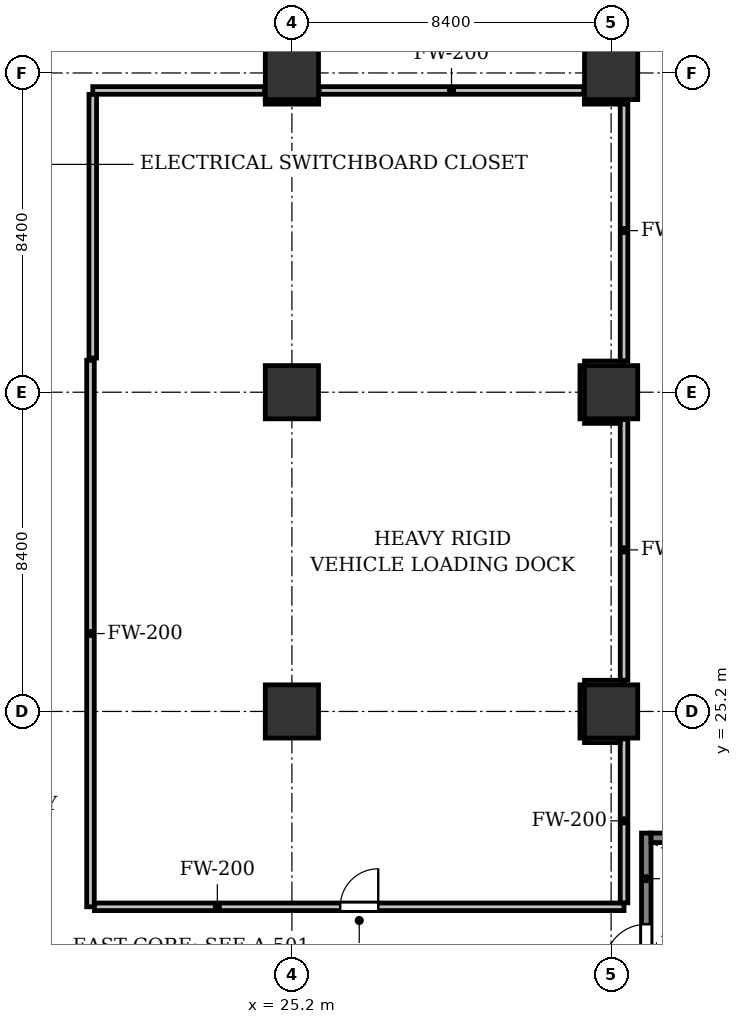
"""IFC4 building model, lengths in metres.
Left out: names, types, materials, properties, quantities, classifications, styles, units other than length and angle.
Written with IfcOpenShell. Run it as: python <this file> out.ifc"""

import sys

from ifc_helpers import new_model, si_unit, direction, frame, frame_2d, origin, origin_2d, place, context, subcontext, project, spatial, rectangle, extrude, element, fill, save


model = new_model("IFC4")
c1 = context("Model", 3, precision=1e-05, world=origin(), true_north=direction((0.0, 1.0)))
c2 = subcontext(c1, "Body", "Model", "MODEL_VIEW")
j1 = project(units=[si_unit("LENGTHUNIT", "METRE"), si_unit("PLANEANGLEUNIT", "RADIAN")], contexts=[c1])
p1 = place(None, origin())
s1 = spatial("IfcSite", under=j1, at=p1, CompositionType="ELEMENT")
p2 = place(p1, origin())
s2 = spatial("IfcBuilding", under=s1, at=p2, CompositionType="ELEMENT")
p3 = place(p2, frame((0.0, 0.0, -4.8)))
s3 = spatial("IfcBuildingStorey", under=s2, at=p3, CompositionType="ELEMENT", Elevation=-4.8)
for number, where, z_axis, x_axis in (
    (1, (25.2, 25.2, 0.0), (0.0, 0.0, 1.0), (1.0, 0.0, 0.0)),
    (2, (25.2, 33.6, 0.0), (0.0, 0.0, 1.0), (1.0, 0.0, 0.0)),
    (3, (25.2, 42.0, 0.0), (0.0, 0.0, 1.0), (1.0, 0.0, 0.0)),
    (4, (33.6, 25.2, 0.0), (0.0, 0.0, 1.0), (1.0, 0.0, 0.0)),
    (5, (33.6, 33.6, 0.0), (0.0, 0.0, 1.0), (1.0, 0.0, 0.0)),
    (6, (33.6, 42.0, 0.0), (0.0, 0.0, 1.0), (1.0, 0.0, 0.0)),
):
    element("IfcColumn", number, at=place(p3, frame(where, z_axis=z_axis, x_axis=x_axis)), inside=s3, PredefinedType="COLUMN", context=c2, shape_type="SweptSolid", body=[
        extrude(rectangle(XDim=1.4, YDim=1.4, at=origin_2d()), origin(), (0.0, 0.0, 1.0), 4.8),
    ])
p4 = place(p3, frame((34.525, 17.55, 0.0), z_axis=(0.0, 0.0, 1.0), x_axis=(0.0, 1.0, 0.0)))
e7 = element("IfcWall", 7, at=p4, inside=s3, PredefinedType="SHEAR", context=c2, shape_type="SweptSolid", body=[
    extrude(rectangle(XDim=4.45, YDim=0.25, at=frame_2d((2.225, 0.0))), origin(), (0.0, 0.0, 1.0), 4.48),
])
p5 = place(p4, frame((0.95, 0.0, 0.0)))
e8 = element("IfcOpeningElement", 8, at=p5, cuts=e7, PredefinedType="OPENING", context=c2, shape_type="SweptSolid", body=[
    extrude(rectangle(XDim=1.1, YDim=2.15, at=frame_2d((0.55, 1.075))), frame((0.0, 0.135, 0.0), z_axis=(0.0, -1.0, 0.0), x_axis=(1.0, 0.0, 0.0)), (0.0, 0.0, 1.0), 0.27),
])
p6 = place(p3, frame((34.65, 21.875, 0.0), z_axis=(0.0, 0.0, 1.0), x_axis=(1.0, 0.0, 0.0)))
e9 = element("IfcWall", 9, at=p6, inside=s3, PredefinedType="SHEAR", context=c2, shape_type="SweptSolid", body=[
    extrude(rectangle(XDim=7.95, YDim=0.25, at=frame_2d((3.975, 0.0))), origin(), (0.0, 0.0, 1.0), 4.48),
])
p7 = place(p3, frame((19.9, 34.44, 0.0), z_axis=(0.0, 0.0, 1.0), x_axis=(0.0, -1.0, 0.0)))
e10 = element("IfcWall", 10, at=p7, inside=s3, PredefinedType="PARTITIONING", context=c2, shape_type="SweptSolid", body=[
    extrude(rectangle(XDim=14.38, YDim=0.2, at=frame_2d((7.19, 0.0))), origin(), (0.0, 0.0, 1.0), 3.78),
])
p8 = place(p3, frame((20.004, 20.06, 0.0), z_axis=(0.0, 0.0, 1.0), x_axis=(1.0, 0.0, 0.0)))
e11 = element("IfcWall", 11, at=p8, inside=s3, PredefinedType="PARTITIONING", context=c2, shape_type="SweptSolid", body=[
    extrude(rectangle(XDim=13.936, YDim=0.2, at=frame_2d((6.968, 0.0))), origin(), (0.0, 0.0, 1.0), 3.868),
])
p9 = place(p8, frame((6.468, 0.0, 0.0)))
e12 = element("IfcOpeningElement", 12, at=p9, cuts=e11, PredefinedType="OPENING", context=c2, shape_type="SweptSolid", body=[
    extrude(rectangle(XDim=1.0, YDim=2.15, at=frame_2d((0.5, 1.075))), frame((0.0, 0.11, 0.0), z_axis=(0.0, -1.0, 0.0), x_axis=(1.0, 0.0, 0.0)), (0.0, 0.0, 1.0), 0.22),
])
p10 = place(p3, frame((33.94, 20.164, 0.0), z_axis=(0.0, 0.0, 1.0), x_axis=(0.0, 1.0, 0.0)))
e13 = element("IfcWall", 13, at=p10, inside=s3, PredefinedType="PARTITIONING", context=c2, shape_type="SweptSolid", body=[
    extrude(rectangle(XDim=4.316, YDim=0.2, at=frame_2d((2.158, 0.0))), origin(), (0.0, 0.0, 1.0), 4.48),
])
p11 = place(p3, frame((33.836, 24.48, 0.0), z_axis=(0.0, 0.0, 1.0), x_axis=(-1.0, 0.0, 0.0)))
e14 = element("IfcWall", 14, at=p11, inside=s3, PredefinedType="PARTITIONING", context=c2, shape_type="SweptSolid", body=[
    extrude(rectangle(XDim=0.936, YDim=0.2, at=frame_2d((0.468, 0.0))), origin(), (0.0, 0.0, 1.0), 3.868),
])
p12 = place(p3, frame((32.88, 24.5, 0.0), z_axis=(0.0, 0.0, 1.0), x_axis=(0.0, 1.0, 0.0)))
e15 = element("IfcWall", 15, at=p12, inside=s3, PredefinedType="PARTITIONING", context=c2, shape_type="SweptSolid", body=[
    extrude(rectangle(XDim=1.4, YDim=0.2, at=frame_2d((0.7, 0.0))), origin(), (0.0, 0.0, 1.0), 3.78),
])
p13 = place(p3, frame((32.9, 25.92, 0.0), z_axis=(0.0, 0.0, 1.0), x_axis=(1.0, 0.0, 0.0)))
e16 = element("IfcWall", 16, at=p13, inside=s3, PredefinedType="PARTITIONING", context=c2, shape_type="SweptSolid", body=[
    extrude(rectangle(XDim=1.04, YDim=0.2, at=frame_2d((0.52, 0.0))), origin(), (0.0, 0.0, 1.0), 3.868),
])
p14 = place(p3, frame((33.94, 26.024, 0.0), z_axis=(0.0, 0.0, 1.0), x_axis=(0.0, 1.0, 0.0)))
e17 = element("IfcWall", 17, at=p14, inside=s3, PredefinedType="PARTITIONING", context=c2, shape_type="SweptSolid", body=[
    extrude(rectangle(XDim=6.856, YDim=0.2, at=frame_2d((3.428, 0.0))), origin(), (0.0, 0.0, 1.0), 4.48),
])
p15 = place(p3, frame((33.836, 32.88, 0.0), z_axis=(0.0, 0.0, 1.0), x_axis=(-1.0, 0.0, 0.0)))
e18 = element("IfcWall", 18, at=p15, inside=s3, PredefinedType="PARTITIONING", context=c2, shape_type="SweptSolid", body=[
    extrude(rectangle(XDim=0.936, YDim=0.2, at=frame_2d((0.468, 0.0))), origin(), (0.0, 0.0, 1.0), 3.868),
])
p16 = place(p3, frame((32.88, 32.9, 0.0), z_axis=(0.0, 0.0, 1.0), x_axis=(0.0, 1.0, 0.0)))
e19 = element("IfcWall", 19, at=p16, inside=s3, PredefinedType="PARTITIONING", context=c2, shape_type="SweptSolid", body=[
    extrude(rectangle(XDim=1.4, YDim=0.2, at=frame_2d((0.7, 0.0))), origin(), (0.0, 0.0, 1.0), 3.78),
])
p17 = place(p3, frame((32.9, 34.32, 0.0), z_axis=(0.0, 0.0, 1.0), x_axis=(1.0, 0.0, 0.0)))
e20 = element("IfcWall", 20, at=p17, inside=s3, PredefinedType="PARTITIONING", context=c2, shape_type="SweptSolid", body=[
    extrude(rectangle(XDim=1.04, YDim=0.2, at=frame_2d((0.52, 0.0))), origin(), (0.0, 0.0, 1.0), 3.868),
])
p18 = place(p3, frame((33.94, 34.424, 0.0), z_axis=(0.0, 0.0, 1.0), x_axis=(0.0, 1.0, 0.0)))
e21 = element("IfcWall", 21, at=p18, inside=s3, PredefinedType="PARTITIONING", context=c2, shape_type="SweptSolid", body=[
    extrude(rectangle(XDim=6.856, YDim=0.2, at=frame_2d((3.428, 0.0))), origin(), (0.0, 0.0, 1.0), 4.48),
])
p19 = place(p3, frame((33.94, 41.28, 0.0), z_axis=(0.0, 0.0, 1.0), x_axis=(-0.999999890616, 0.000467726796, 0.0)))
e22 = element("IfcWall", 22, at=p19, inside=s3, PredefinedType="PARTITIONING", context=c2, shape_type="SweptSolid", body=[
    extrude(rectangle(XDim=1.044, YDim=0.2, at=frame_2d((0.522, 0.0))), origin(), (0.0, 0.0, 1.0), 3.868),
])
p20 = place(p3, frame((32.88, 41.54, 0.0), z_axis=(0.0, 0.0, 1.0), x_axis=(-1.0, 0.0, 0.0)))
e23 = element("IfcWall", 23, at=p20, inside=s3, PredefinedType="PARTITIONING", context=c2, shape_type="SweptSolid", body=[
    extrude(rectangle(XDim=6.96, YDim=0.2, at=frame_2d((3.48, 0.0))), origin(), (0.0, 0.0, 1.0), 4.074),
])
p21 = place(p3, frame((25.904, 41.281, 0.0), z_axis=(0.0, 0.0, 1.0), x_axis=(-0.999999939509, -0.000347826066, 0.0)))
e24 = element("IfcWall", 24, at=p21, inside=s3, PredefinedType="PARTITIONING", context=c2, shape_type="SweptSolid", body=[
    extrude(rectangle(XDim=1.404, YDim=0.2, at=frame_2d((0.702, 0.0))), origin(), (0.0, 0.0, 1.0), 3.868),
])
p22 = place(p3, frame((24.48, 41.54, 0.0), z_axis=(0.0, 0.0, 1.0), x_axis=(-1.0, 0.0, 0.0)))
e25 = element("IfcWall", 25, at=p22, inside=s3, PredefinedType="PARTITIONING", context=c2, shape_type="SweptSolid", body=[
    extrude(rectangle(XDim=4.52, YDim=0.2, at=frame_2d((2.26, 0.0))), origin(), (0.0, 0.0, 1.0), 4.074),
])
p23 = place(p3, frame((19.96, 41.436, 0.0), z_axis=(0.0, 0.0, 1.0), x_axis=(0.0, -1.0, 0.0)))
e26 = element("IfcWall", 26, at=p23, inside=s3, PredefinedType="PARTITIONING", context=c2, shape_type="SweptSolid", body=[
    extrude(rectangle(XDim=6.936, YDim=0.2, at=frame_2d((3.468, 0.0))), origin(), (0.0, 0.0, 1.0), 4.48),
])
p24 = place(p5, origin())
e27 = element("IfcDoor", 27, at=p24, inside=s3, OperationType="SINGLE_SWING_LEFT", PredefinedType="DOOR", context=c2, shape_type="SweptSolid", body=[
    extrude(rectangle(XDim=1.1, YDim=2.15, at=frame_2d((0.55, 1.075))), frame((0.0, 0.025, 0.0), z_axis=(0.0, -1.0, 0.0), x_axis=(1.0, 0.0, 0.0)), (0.0, 0.0, 1.0), 0.05),
])
fill(e8, e27)
p25 = place(p9, origin())
e28 = element("IfcDoor", 28, at=p25, inside=s3, OperationType="SINGLE_SWING_RIGHT", PredefinedType="DOOR", context=c2, shape_type="SweptSolid", body=[
    extrude(rectangle(XDim=1.0, YDim=2.15, at=frame_2d((0.5, 1.075))), frame((0.0, 0.025, 0.0), z_axis=(0.0, -1.0, 0.0), x_axis=(1.0, 0.0, 0.0)), (0.0, 0.0, 1.0), 0.05),
])
fill(e12, e28)
save(model, sys.argv[1])
